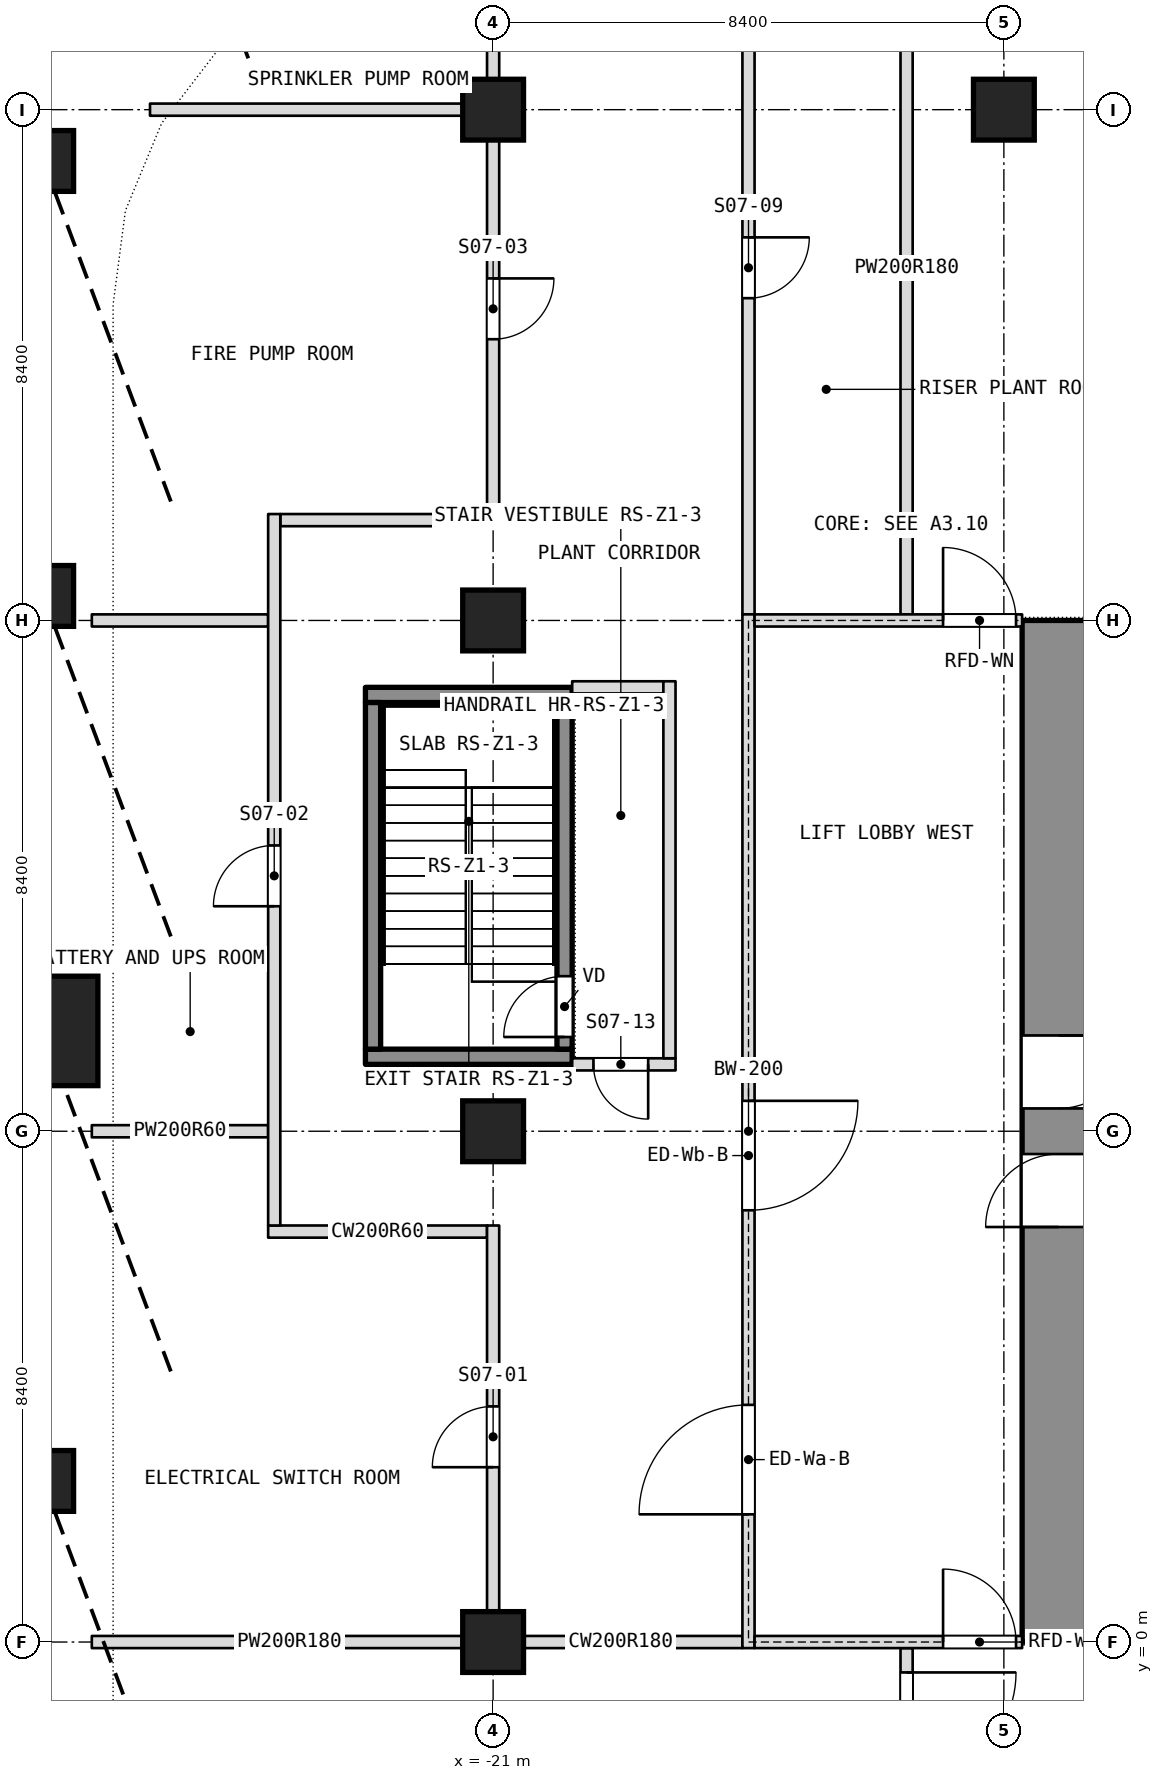
"""IFC4 building model, lengths in metres.
Left out: names, types, materials, properties, quantities, classifications, styles, units other than length and angle.
Written with IfcOpenShell. Run it as: python <this file> out.ifc"""

import sys

from ifc_helpers import new_model, si_unit, direction, frame, frame_2d, origin, origin_2d, place, context, subcontext, project, spatial, rectangle, i_section, extrude, element, fill, save


model = new_model("IFC4")
c1 = context("Model", 3, precision=1e-05, world=origin(), true_north=direction((0.0, 1.0)))
c2 = subcontext(c1, "Body", "Model", "MODEL_VIEW")
j1 = project(units=[si_unit("LENGTHUNIT", "METRE"), si_unit("PLANEANGLEUNIT", "RADIAN")], contexts=[c1])
p1 = place(None, origin())
s1 = spatial("IfcSite", under=j1, at=p1, CompositionType="ELEMENT")
p2 = place(p1, origin())
s2 = spatial("IfcBuilding", under=s1, at=p2, CompositionType="ELEMENT")
p3 = place(p2, frame((0.0, 0.0, 86.9)))
s3 = spatial("IfcBuildingStorey", under=s2, at=p3, CompositionType="ELEMENT", Elevation=86.9)
p4 = place(p3, frame((-11.7, 0.0, 0.0), z_axis=(0.0, 0.0, 1.0), x_axis=(0.0, 1.0, 0.0)))
e1 = element("IfcWall", 1, at=p4, inside=s3, PredefinedType="SHEAR", context=c2, shape_type="SweptSolid", body=[
    extrude(rectangle(XDim=16.8, YDim=1.2, at=frame_2d((8.4, 0.0))), origin(), (0.0, 0.0, 1.0), 10.8),
])
p5 = place(p4, frame((6.825, 0.0, 0.0)))
e2 = element("IfcOpeningElement", 2, at=p5, cuts=e1, PredefinedType="OPENING", context=c2, shape_type="SweptSolid", body=[
    extrude(rectangle(XDim=1.2, YDim=2.1, at=frame_2d((0.6, 1.05))), frame((0.0, 0.6, 0.0), z_axis=(0.0, -1.0, 0.0), x_axis=(1.0, 0.0, 0.0)), (0.0, 0.0, 1.0), 1.2),
])
p6 = place(p4, frame((8.775, 0.0, 0.0)))
e3 = element("IfcOpeningElement", 3, at=p6, cuts=e1, PredefinedType="OPENING", context=c2, shape_type="SweptSolid", body=[
    extrude(rectangle(XDim=1.2, YDim=2.1, at=frame_2d((0.6, 1.05))), frame((0.0, 0.6, 0.0), z_axis=(0.0, -1.0, 0.0), x_axis=(1.0, 0.0, 0.0)), (0.0, 0.0, 1.0), 1.2),
])
for number, where, z_axis, x_axis in (
    (4, (-21.0, 0.0, 0.0), (0.0, 0.0, 1.0), (1.0, 0.0, 0.0)),
    (5, (-21.0, 8.4, 0.0), (0.0, 0.0, 1.0), (1.0, 0.0, 0.0)),
    (6, (-21.0, 16.8, 0.0), (0.0, 0.0, 1.0), (1.0, 0.0, 0.0)),
    (7, (-21.0, 25.2, 0.0), (0.0, 0.0, 1.0), (1.0, 0.0, 0.0)),
):
    element("IfcColumn", number, at=place(p3, frame(where, z_axis=z_axis, x_axis=x_axis)), inside=s3, PredefinedType="COLUMN", context=c2, shape_type="SweptSolid", body=[
        extrude(rectangle(XDim=1.0, YDim=1.0, at=origin_2d()), origin(), (0.0, 0.0, 1.0), 10.8),
    ])
p7 = place(p3, frame((-12.6, 25.2, 0.0), z_axis=(0.0, 0.0, 1.0), x_axis=(1.0, 0.0, 0.0)))
e8 = element("IfcColumn", 8, at=p7, inside=s3, PredefinedType="COLUMN", context=c2, shape_type="SweptSolid", body=[
    extrude(rectangle(XDim=1.0, YDim=1.0, at=origin_2d()), origin(), (0.0, 0.0, 1.0), 10.54),
])
for number, where, z_axis, x_axis in (
    (9, (-28.4, 2.649, 0.0), (0.0, 0.0, 1.0), (1.0, 0.0, 0.0)),
    (10, (-28.4, 10.05, 0.0), (0.0, 0.0, 1.0), (1.0, 0.0, 0.0)),
    (11, (-28.4, 17.203, 0.0), (0.0, 0.0, 1.0), (1.0, 0.0, 0.0)),
    (12, (-28.4, 24.356, 0.0), (0.0, 0.0, 1.0), (1.0, 0.0, 0.0)),
):
    element("IfcColumn", number, at=place(p3, frame(where, z_axis=z_axis, x_axis=x_axis)), inside=s3, PredefinedType="COLUMN", context=c2, shape_type="SweptSolid", body=[
        extrude(i_section(OverallWidth=0.306, OverallDepth=0.524, WebThickness=0.024, FlangeThickness=0.04, FilletRadius=0.027, at=origin_2d()), origin(), (0.0, 0.0, 1.0), 10.14),
    ])
p8 = place(p3, frame((-27.6, 0.0, 0.0), z_axis=(0.0, 0.0, 1.0), x_axis=(1.0, 0.0, 0.0)))
e13 = element("IfcWall", 13, at=p8, inside=s3, PredefinedType="PARTITIONING", context=c2, shape_type="SweptSolid", body=[
    extrude(rectangle(XDim=6.5, YDim=0.2, at=frame_2d((3.25, 0.0))), origin(), (0.0, 0.0, 1.0), 10.09),
])
p9 = place(p3, frame((-20.9, 0.0, 0.0), z_axis=(0.0, 0.0, 1.0), x_axis=(1.0, 0.0, 0.0)))
e14 = element("IfcWall", 14, at=p9, inside=s3, PredefinedType="PARTITIONING", context=c2, shape_type="SweptSolid", body=[
    extrude(rectangle(XDim=4.0, YDim=0.2, at=frame_2d((2.0, 0.0))), origin(), (0.0, 0.0, 1.0), 10.09),
])
p10 = place(p3, frame((-24.7, 6.75, 0.0), z_axis=(0.0, 0.0, 1.0), x_axis=(1.0, 0.0, 0.0)))
e15 = element("IfcWall", 15, at=p10, inside=s3, PredefinedType="PARTITIONING", context=c2, shape_type="SweptSolid", body=[
    extrude(rectangle(XDim=3.6, YDim=0.2, at=frame_2d((1.8, 0.0))), origin(), (0.0, 0.0, 1.0), 10.54),
])
p11 = place(p3, frame((-27.6, 8.4, 0.0), z_axis=(0.0, 0.0, 1.0), x_axis=(1.0, 0.0, 0.0)))
e16 = element("IfcWall", 16, at=p11, inside=s3, PredefinedType="PARTITIONING", context=c2, shape_type="SweptSolid", body=[
    extrude(rectangle(XDim=2.9, YDim=0.2, at=frame_2d((1.45, 0.0))), origin(), (0.0, 0.0, 1.0), 10.09),
])
p12 = place(p3, frame((-19.7, 9.5, 0.0), z_axis=(0.0, 0.0, 1.0), x_axis=(1.0, 0.0, 0.0)))
e17 = element("IfcWall", 17, at=p12, inside=s3, PredefinedType="PARTITIONING", context=c2, shape_type="SweptSolid", body=[
    extrude(rectangle(XDim=1.7, YDim=0.2, at=frame_2d((0.85, 0.0))), origin(), (0.0, 0.0, 1.0), 10.54),
])
p13 = place(p12, frame((0.35, 0.0, 0.0)))
e18 = element("IfcOpeningElement", 18, at=p13, cuts=e17, PredefinedType="OPENING", context=c2, shape_type="SweptSolid", body=[
    extrude(rectangle(XDim=0.9, YDim=2.1, at=frame_2d((0.45, 1.05))), frame((0.0, 0.1, 0.0), z_axis=(0.0, -1.0, 0.0), x_axis=(1.0, 0.0, 0.0)), (0.0, 0.0, 1.0), 0.2),
])
p14 = place(p3, frame((-14.2, -17.699, 0.0), z_axis=(0.0, 0.0, 1.0), x_axis=(0.0, 1.0, 0.0)))
e19 = element("IfcWall", 19, at=p14, inside=s3, PredefinedType="PARTITIONING", context=c2, shape_type="SweptSolid", body=[
    extrude(rectangle(XDim=17.599, YDim=0.2, at=frame_2d((8.799, 0.0))), origin(), (0.0, 0.0, 1.0), 10.54),
])
p15 = place(p14, frame((15.399, 0.0, 0.0)))
e20 = element("IfcOpeningElement", 20, at=p15, cuts=e19, PredefinedType="OPENING", context=c2, shape_type="SweptSolid", body=[
    extrude(rectangle(XDim=1.8, YDim=2.1, at=frame_2d((0.9, 1.05))), frame((0.0, 0.1, 0.0), z_axis=(0.0, -1.0, 0.0), x_axis=(1.0, 0.0, 0.0)), (0.0, 0.0, 1.0), 0.2),
])
p16 = place(p3, frame((-14.2, 16.9, 0.0), z_axis=(0.0, 0.0, 1.0), x_axis=(0.0, 1.0, 0.0)))
e21 = element("IfcWall", 21, at=p16, inside=s3, PredefinedType="PARTITIONING", context=c2, shape_type="SweptSolid", body=[
    extrude(rectangle(XDim=11.4, YDim=0.2, at=frame_2d((5.7, 0.0))), origin(), (0.0, 0.0, 1.0), 10.54),
])
p17 = place(p3, frame((-19.7, 15.7, 0.0), z_axis=(0.0, 0.0, 1.0), x_axis=(1.0, 0.0, 0.0)))
e22 = element("IfcWall", 22, at=p17, inside=s3, PredefinedType="PARTITIONING", context=c2, shape_type="SweptSolid", body=[
    extrude(rectangle(XDim=1.5, YDim=0.2, at=frame_2d((0.75, 0.0))), origin(), (0.0, 0.0, 1.0), 10.54),
])
p18 = place(p3, frame((-16.8, 16.9, 0.0), z_axis=(0.0, 0.0, 1.0), x_axis=(0.0, 1.0, 0.0)))
e23 = element("IfcWall", 23, at=p18, inside=s3, PredefinedType="PARTITIONING", context=c2, shape_type="SweptSolid", body=[
    extrude(rectangle(XDim=11.4, YDim=0.2, at=frame_2d((5.7, 0.0))), origin(), (0.0, 0.0, 1.0), 10.14),
])
p19 = place(p18, frame((5.2, 0.0, 0.0)))
e24 = element("IfcOpeningElement", 24, at=p19, cuts=e23, PredefinedType="OPENING", context=c2, shape_type="SweptSolid", body=[
    extrude(rectangle(XDim=1.0, YDim=2.1, at=frame_2d((0.5, 1.05))), frame((0.0, 0.1, 0.0), z_axis=(0.0, -1.0, 0.0), x_axis=(1.0, 0.0, 0.0)), (0.0, 0.0, 1.0), 0.2),
])
p20 = place(p3, frame((-27.6, 16.8, 0.0), z_axis=(0.0, 0.0, 1.0), x_axis=(1.0, 0.0, 0.0)))
e25 = element("IfcWall", 25, at=p20, inside=s3, PredefinedType="PARTITIONING", context=c2, shape_type="SweptSolid", body=[
    extrude(rectangle(XDim=2.9, YDim=0.2, at=frame_2d((1.45, 0.0))), origin(), (0.0, 0.0, 1.0), 10.09),
])
p21 = place(p3, frame((-18.1, 9.6, 0.0), z_axis=(0.0, 0.0, 1.0), x_axis=(0.0, 1.0, 0.0)))
e26 = element("IfcWall", 26, at=p21, inside=s3, PredefinedType="PARTITIONING", context=c2, shape_type="SweptSolid", body=[
    extrude(rectangle(XDim=6.2, YDim=0.2, at=frame_2d((3.1, 0.0))), origin(), (0.0, 0.0, 1.0), 10.54),
])
p22 = place(p3, frame((-24.5, 18.45, 0.0), z_axis=(0.0, 0.0, 1.0), x_axis=(1.0, 0.0, 0.0)))
e27 = element("IfcWall", 27, at=p22, inside=s3, PredefinedType="PARTITIONING", context=c2, shape_type="SweptSolid", body=[
    extrude(rectangle(XDim=3.6, YDim=0.2, at=frame_2d((1.8, 0.0))), origin(), (0.0, 0.0, 1.0), 10.54),
])
p23 = place(p3, frame((-21.0, -0.1, 0.0), z_axis=(0.0, 0.0, 1.0), x_axis=(0.0, 1.0, 0.0)))
e28 = element("IfcWall", 28, at=p23, inside=s3, PredefinedType="PARTITIONING", context=c2, shape_type="SweptSolid", body=[
    extrude(rectangle(XDim=6.95, YDim=0.2, at=frame_2d((3.475, 0.0))), origin(), (0.0, 0.0, 1.0), 10.54),
])
p24 = place(p23, frame((2.975, 0.0, 0.0)))
e29 = element("IfcOpeningElement", 29, at=p24, cuts=e28, PredefinedType="OPENING", context=c2, shape_type="SweptSolid", body=[
    extrude(rectangle(XDim=1.0, YDim=2.1, at=frame_2d((0.5, 1.05))), frame((0.0, 0.1, 0.0), z_axis=(0.0, -1.0, 0.0), x_axis=(1.0, 0.0, 0.0)), (0.0, 0.0, 1.0), 0.2),
])
p25 = place(p3, frame((-21.0, 18.55, 0.0), z_axis=(0.0, 0.0, 1.0), x_axis=(0.0, 1.0, 0.0)))
e30 = element("IfcWall", 30, at=p25, inside=s3, PredefinedType="PARTITIONING", context=c2, shape_type="SweptSolid", body=[
    extrude(rectangle(XDim=9.75, YDim=0.2, at=frame_2d((4.875, 0.0))), origin(), (0.0, 0.0, 1.0), 10.14),
])
p26 = place(p25, frame((2.875, 0.0, 0.0)))
e31 = element("IfcOpeningElement", 31, at=p26, cuts=e30, PredefinedType="OPENING", context=c2, shape_type="SweptSolid", body=[
    extrude(rectangle(XDim=1.0, YDim=2.1, at=frame_2d((0.5, 1.05))), frame((0.0, 0.1, 0.0), z_axis=(0.0, -1.0, 0.0), x_axis=(1.0, 0.0, 0.0)), (0.0, 0.0, 1.0), 0.2),
])
p27 = place(p25, frame((7.65, 0.0, 0.0)))
e32 = element("IfcOpeningElement", 32, at=p27, cuts=e30, PredefinedType="OPENING", context=c2, shape_type="SweptSolid", body=[
    extrude(rectangle(XDim=1.0, YDim=2.1, at=frame_2d((0.5, 1.05))), frame((0.0, 0.1, 0.0), z_axis=(0.0, -1.0, 0.0), x_axis=(1.0, 0.0, 0.0)), (0.0, 0.0, 1.0), 0.2),
])
p28 = place(p3, frame((-24.6, 6.85, 0.0), z_axis=(0.0, 0.0, 1.0), x_axis=(0.0, 1.0, 0.0)))
e33 = element("IfcWall", 33, at=p28, inside=s3, PredefinedType="PARTITIONING", context=c2, shape_type="SweptSolid", body=[
    extrude(rectangle(XDim=11.7, YDim=0.2, at=frame_2d((5.85, 0.0))), origin(), (0.0, 0.0, 1.0), 10.54),
])
p29 = place(p28, frame((5.25, 0.0, 0.0)))
e34 = element("IfcOpeningElement", 34, at=p29, cuts=e33, PredefinedType="OPENING", context=c2, shape_type="SweptSolid", body=[
    extrude(rectangle(XDim=1.0, YDim=2.1, at=frame_2d((0.5, 1.05))), frame((0.0, 0.1, 0.0), z_axis=(0.0, -1.0, 0.0), x_axis=(1.0, 0.0, 0.0)), (0.0, 0.0, 1.0), 0.2),
])
p30 = place(p3, frame((-26.643, 25.2, 0.0), z_axis=(0.0, 0.0, 1.0), x_axis=(1.0, 0.0, 0.0)))
e35 = element("IfcWall", 35, at=p30, inside=s3, PredefinedType="PARTITIONING", context=c2, shape_type="SweptSolid", body=[
    extrude(rectangle(XDim=5.543, YDim=0.2, at=frame_2d((2.771, 0.0))), origin(), (0.0, 0.0, 1.0), 10.09),
])
p31 = place(p3, frame((-16.8, -0.1, 0.0), z_axis=(0.0, 0.0, 1.0), x_axis=(0.0, 1.0, 0.0)))
e36 = element("IfcWall", 36, at=p31, inside=s3, PredefinedType="PARTITIONING", context=c2, shape_type="SweptSolid", body=[
    extrude(rectangle(XDim=17.0, YDim=0.2, at=frame_2d((8.5, 0.0))), origin(), (0.0, 0.0, 1.0), 10.54),
])
p32 = place(p31, frame((2.2, 0.0, 0.0)))
e37 = element("IfcOpeningElement", 37, at=p32, cuts=e36, PredefinedType="OPENING", context=c2, shape_type="SweptSolid", body=[
    extrude(rectangle(XDim=1.8, YDim=2.1, at=frame_2d((0.9, 1.05))), frame((0.0, 0.1, 0.0), z_axis=(0.0, -1.0, 0.0), x_axis=(1.0, 0.0, 0.0)), (0.0, 0.0, 1.0), 0.2),
])
p33 = place(p31, frame((7.2, 0.0, 0.0)))
e38 = element("IfcOpeningElement", 38, at=p33, cuts=e36, PredefinedType="OPENING", context=c2, shape_type="SweptSolid", body=[
    extrude(rectangle(XDim=1.8, YDim=2.1, at=frame_2d((0.9, 1.05))), frame((0.0, 0.1, 0.0), z_axis=(0.0, -1.0, 0.0), x_axis=(1.0, 0.0, 0.0)), (0.0, 0.0, 1.0), 0.2),
])
p34 = place(p3, frame((-16.7, 0.0, 0.0), z_axis=(0.0, 0.0, 1.0), x_axis=(1.0, 0.0, 0.0)))
e39 = element("IfcWall", 39, at=p34, inside=s3, PredefinedType="PARTITIONING", context=c2, shape_type="SweptSolid", body=[
    extrude(rectangle(XDim=4.4, YDim=0.2, at=frame_2d((2.2, 0.0))), origin(), (0.0, 0.0, 1.0), 10.09),
])
p35 = place(p34, frame((3.1, 0.0, 0.0)))
e40 = element("IfcOpeningElement", 40, at=p35, cuts=e39, PredefinedType="OPENING", context=c2, shape_type="SweptSolid", body=[
    extrude(rectangle(XDim=1.2, YDim=2.1, at=frame_2d((0.6, 1.05))), frame((0.0, 0.1, 0.0), z_axis=(0.0, -1.0, 0.0), x_axis=(1.0, 0.0, 0.0)), (0.0, 0.0, 1.0), 0.2),
])
p36 = place(p3, frame((-16.7, 16.8, 0.0), z_axis=(0.0, 0.0, 1.0), x_axis=(1.0, 0.0, 0.0)))
e41 = element("IfcWall", 41, at=p36, inside=s3, PredefinedType="PARTITIONING", context=c2, shape_type="SweptSolid", body=[
    extrude(rectangle(XDim=4.4, YDim=0.2, at=frame_2d((2.2, 0.0))), origin(), (0.0, 0.0, 1.0), 10.09),
])
p37 = place(p36, frame((3.1, 0.0, 0.0)))
e42 = element("IfcOpeningElement", 42, at=p37, cuts=e41, PredefinedType="OPENING", context=c2, shape_type="SweptSolid", body=[
    extrude(rectangle(XDim=1.2, YDim=2.1, at=frame_2d((0.6, 1.05))), frame((0.0, 0.1, 0.0), z_axis=(0.0, -1.0, 0.0), x_axis=(1.0, 0.0, 0.0)), (0.0, 0.0, 1.0), 0.2),
])
for number, where, z_axis, x_axis in (
    (43, (-23.1, 9.625, 0.1), (0.0, 0.0, 1.0), (1.0, 0.0, 0.0)),
    (44, (-23.1, 15.575, 0.1), (0.0, 0.0, 1.0), (1.0, 0.0, 0.0)),
):
    element("IfcWall", number, at=place(p3, frame(where, z_axis=z_axis, x_axis=x_axis)), inside=s3, PredefinedType="SHEAR", context=c2, shape_type="SweptSolid", body=[
        extrude(rectangle(XDim=3.4, YDim=0.25, at=frame_2d((1.7, 0.0))), origin(), (0.0, 0.0, 1.0), 10.8),
    ])
p38 = place(p3, frame((-22.975, 9.75, 0.1), z_axis=(0.0, 0.0, 1.0), x_axis=(0.0, 1.0, 0.0)))
e45 = element("IfcWall", 45, at=p38, inside=s3, PredefinedType="SHEAR", context=c2, shape_type="SweptSolid", body=[
    extrude(rectangle(XDim=5.7, YDim=0.25, at=frame_2d((2.85, 0.0))), origin(), (0.0, 0.0, 1.0), 10.8),
])
p39 = place(p3, frame((-19.825, 9.75, 0.1), z_axis=(0.0, 0.0, 1.0), x_axis=(0.0, 1.0, 0.0)))
e46 = element("IfcWall", 46, at=p39, inside=s3, PredefinedType="SHEAR", context=c2, shape_type="SweptSolid", body=[
    extrude(rectangle(XDim=5.7, YDim=0.25, at=frame_2d((2.85, 0.0))), origin(), (0.0, 0.0, 1.0), 10.8),
])
p40 = place(p39, frame((0.2, 0.0, 0.0)))
e47 = element("IfcOpeningElement", 47, at=p40, cuts=e46, PredefinedType="OPENING", context=c2, shape_type="SweptSolid", body=[
    extrude(rectangle(XDim=1.0, YDim=2.1, at=frame_2d((0.5, 1.05))), frame((0.0, 0.125, 0.0), z_axis=(0.0, -1.0, 0.0), x_axis=(1.0, 0.0, 0.0)), (0.0, 0.0, 1.0), 0.25),
])
p41 = place(p24, origin())
e48 = element("IfcDoor", 48, at=p41, inside=s3, OperationType="SINGLE_SWING_LEFT", PredefinedType="DOOR", context=c2, shape_type="SweptSolid", body=[
    extrude(rectangle(XDim=1.0, YDim=2.1, at=frame_2d((0.5, 1.05))), frame((0.0, 0.025, 0.0), z_axis=(0.0, -1.0, 0.0), x_axis=(1.0, 0.0, 0.0)), (0.0, 0.0, 1.0), 0.05),
])
fill(e29, e48)
p42 = place(p29, origin())
e49 = element("IfcDoor", 49, at=p42, inside=s3, OperationType="SINGLE_SWING_RIGHT", PredefinedType="DOOR", context=c2, shape_type="SweptSolid", body=[
    extrude(rectangle(XDim=1.0, YDim=2.1, at=frame_2d((0.5, 1.05))), frame((0.0, 0.025, 0.0), z_axis=(0.0, -1.0, 0.0), x_axis=(1.0, 0.0, 0.0)), (0.0, 0.0, 1.0), 0.05),
])
fill(e34, e49)
p43 = place(p26, origin())
e50 = element("IfcDoor", 50, at=p43, inside=s3, OperationType="SINGLE_SWING_RIGHT", PredefinedType="DOOR", context=c2, shape_type="SweptSolid", body=[
    extrude(rectangle(XDim=1.0, YDim=2.1, at=frame_2d((0.5, 1.05))), frame((0.0, 0.025, 0.0), z_axis=(0.0, -1.0, 0.0), x_axis=(1.0, 0.0, 0.0)), (0.0, 0.0, 1.0), 0.05),
])
fill(e31, e50)
p44 = place(p19, origin())
e51 = element("IfcDoor", 51, at=p44, inside=s3, OperationType="SINGLE_SWING_RIGHT", PredefinedType="DOOR", context=c2, shape_type="SweptSolid", body=[
    extrude(rectangle(XDim=1.0, YDim=2.1, at=frame_2d((0.5, 1.05))), frame((0.0, 0.025, 0.0), z_axis=(0.0, -1.0, 0.0), x_axis=(1.0, 0.0, 0.0)), (0.0, 0.0, 1.0), 0.05),
])
fill(e24, e51)
p45 = place(p15, origin())
e52 = element("IfcDoor", 52, at=p45, inside=s3, OperationType="DOUBLE_DOOR_SINGLE_SWING", PredefinedType="DOOR", context=c2, shape_type="SweptSolid", body=[
    extrude(rectangle(XDim=1.8, YDim=2.1, at=frame_2d((0.9, 1.05))), frame((0.0, 0.025, 0.0), z_axis=(0.0, -1.0, 0.0), x_axis=(1.0, 0.0, 0.0)), (0.0, 0.0, 1.0), 0.05),
])
fill(e20, e52)
p46 = place(p13, origin())
e53 = element("IfcDoor", 53, at=p46, inside=s3, OperationType="SINGLE_SWING_RIGHT", PredefinedType="DOOR", context=c2, shape_type="SweptSolid", body=[
    extrude(rectangle(XDim=0.9, YDim=2.1, at=frame_2d((0.45, 1.05))), frame((0.0, 0.025, 0.0), z_axis=(0.0, -1.0, 0.0), x_axis=(1.0, 0.0, 0.0)), (0.0, 0.0, 1.0), 0.05),
])
fill(e18, e53)
p47 = place(p40, origin())
e54 = element("IfcDoor", 54, at=p47, inside=s3, OperationType="SINGLE_SWING_LEFT", PredefinedType="DOOR", context=c2, shape_type="SweptSolid", body=[
    extrude(rectangle(XDim=1.0, YDim=2.1, at=frame_2d((0.5, 1.05))), frame((0.0, 0.025, 0.0), z_axis=(0.0, -1.0, 0.0), x_axis=(1.0, 0.0, 0.0)), (0.0, 0.0, 1.0), 0.05),
])
fill(e47, e54)
p48 = place(p5, origin())
e55 = element("IfcDoor", 55, at=p48, inside=s3, OperationType="SINGLE_SWING_LEFT", PredefinedType="DOOR", context=c2, shape_type="SweptSolid", body=[
    extrude(rectangle(XDim=1.2, YDim=2.1, at=frame_2d((0.6, 1.05))), frame((0.0, 0.025, 0.0), z_axis=(0.0, -1.0, 0.0), x_axis=(1.0, 0.0, 0.0)), (0.0, 0.0, 1.0), 0.05),
])
fill(e2, e55)
p49 = place(p6, origin())
e56 = element("IfcDoor", 56, at=p49, inside=s3, OperationType="SINGLE_SWING_LEFT", PredefinedType="DOOR", context=c2, shape_type="SweptSolid", body=[
    extrude(rectangle(XDim=1.2, YDim=2.1, at=frame_2d((0.6, 1.05))), frame((0.0, 0.025, 0.0), z_axis=(0.0, -1.0, 0.0), x_axis=(1.0, 0.0, 0.0)), (0.0, 0.0, 1.0), 0.05),
])
fill(e3, e56)
p50 = place(p32, origin())
e57 = element("IfcDoor", 57, at=p50, inside=s3, OperationType="DOUBLE_DOOR_SINGLE_SWING", PredefinedType="DOOR", context=c2, shape_type="SweptSolid", body=[
    extrude(rectangle(XDim=1.8, YDim=2.1, at=frame_2d((0.9, 1.05))), frame((0.0, 0.025, 0.0), z_axis=(0.0, -1.0, 0.0), x_axis=(1.0, 0.0, 0.0)), (0.0, 0.0, 1.0), 0.05),
])
fill(e37, e57)
p51 = place(p33, origin())
e58 = element("IfcDoor", 58, at=p51, inside=s3, OperationType="DOUBLE_DOOR_SINGLE_SWING", PredefinedType="DOOR", context=c2, shape_type="SweptSolid", body=[
    extrude(rectangle(XDim=1.8, YDim=2.1, at=frame_2d((0.9, 1.05))), frame((0.0, 0.025, 0.0), z_axis=(0.0, -1.0, 0.0), x_axis=(1.0, 0.0, 0.0)), (0.0, 0.0, 1.0), 0.05),
])
fill(e38, e58)
p52 = place(p35, origin())
e59 = element("IfcDoor", 59, at=p52, inside=s3, OperationType="SINGLE_SWING_LEFT", PredefinedType="DOOR", context=c2, shape_type="SweptSolid", body=[
    extrude(rectangle(XDim=1.2, YDim=2.1, at=frame_2d((0.6, 1.05))), frame((0.0, 0.025, 0.0), z_axis=(0.0, -1.0, 0.0), x_axis=(1.0, 0.0, 0.0)), (0.0, 0.0, 1.0), 0.05),
])
fill(e40, e59)
p53 = place(p37, origin())
e60 = element("IfcDoor", 60, at=p53, inside=s3, OperationType="SINGLE_SWING_LEFT", PredefinedType="DOOR", context=c2, shape_type="SweptSolid", body=[
    extrude(rectangle(XDim=1.2, YDim=2.1, at=frame_2d((0.6, 1.05))), frame((0.0, 0.025, 0.0), z_axis=(0.0, -1.0, 0.0), x_axis=(1.0, 0.0, 0.0)), (0.0, 0.0, 1.0), 0.05),
])
fill(e42, e60)
save(model, sys.argv[1])
